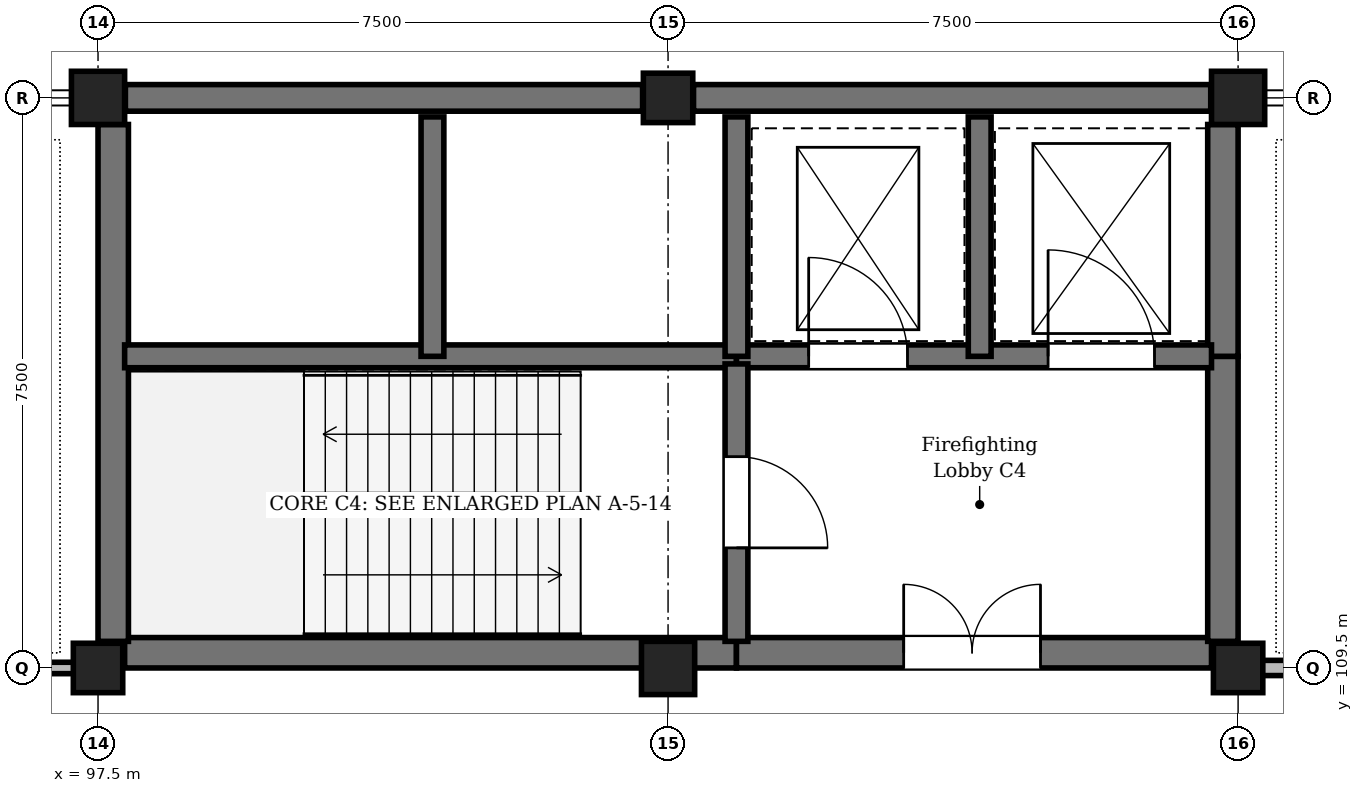
"""IFC4 building model, lengths in metres.
Left out: names, types, materials, properties, quantities, classifications, styles, units other than length and angle.
Written with IfcOpenShell. Run it as: python <this file> out.ifc"""

import sys

from ifc_helpers import new_model, si_unit, direction, frame, frame_2d, origin, origin_2d, place, context, subcontext, project, spatial, rectangle, extrude, element, fill, save


model = new_model("IFC4")
c1 = context("Model", 3, precision=1e-05, world=origin(), true_north=direction((0.0, 1.0)))
c2 = subcontext(c1, "Body", "Model", "MODEL_VIEW")
j1 = project(units=[si_unit("LENGTHUNIT", "METRE"), si_unit("PLANEANGLEUNIT", "RADIAN")], contexts=[c1])
p1 = place(None, origin())
s1 = spatial("IfcSite", under=j1, at=p1, CompositionType="ELEMENT")
p2 = place(p1, origin())
s2 = spatial("IfcBuilding", under=s1, at=p2, CompositionType="ELEMENT")
p3 = place(p2, frame((0.0, 0.0, 9.3)))
s3 = spatial("IfcBuildingStorey", under=s2, at=p3, CompositionType="ELEMENT", Elevation=9.3)
p4 = place(p3, frame((97.5, 109.5, 0.0), z_axis=(0.0, 0.0, 1.0), x_axis=(1.0, 0.0, 0.0)))
e1 = element("IfcColumn", 1, at=p4, inside=s3, PredefinedType="COLUMN", context=c2, shape_type="SweptSolid", body=[
    extrude(rectangle(XDim=0.65, YDim=0.65, at=origin_2d()), origin(), (0.0, 0.0, 1.0), 4.8),
])
for number, where, z_axis, x_axis in (
    (2, (97.5, 117.0, 0.0), (0.0, 0.0, 1.0), (1.0, 0.0, 0.0)),
    (3, (105.0, 109.5, 0.0), (0.0, 0.0, 1.0), (1.0, 0.0, 0.0)),
):
    element("IfcColumn", number, at=place(p3, frame(where, z_axis=z_axis, x_axis=x_axis)), inside=s3, PredefinedType="COLUMN", context=c2, shape_type="SweptSolid", body=[
        extrude(rectangle(XDim=0.7, YDim=0.7, at=origin_2d()), origin(), (0.0, 0.0, 1.0), 4.8),
    ])
for number, where, z_axis, x_axis in (
    (4, (105.0, 117.0, 0.0), (0.0, 0.0, 1.0), (1.0, 0.0, 0.0)),
    (5, (112.5, 109.5, 0.0), (0.0, 0.0, 1.0), (1.0, 0.0, 0.0)),
):
    element("IfcColumn", number, at=place(p3, frame(where, z_axis=z_axis, x_axis=x_axis)), inside=s3, PredefinedType="COLUMN", context=c2, shape_type="SweptSolid", body=[
        extrude(rectangle(XDim=0.65, YDim=0.65, at=origin_2d()), origin(), (0.0, 0.0, 1.0), 4.8),
    ])
p5 = place(p3, frame((112.5, 117.0, 0.0), z_axis=(0.0, 0.0, 1.0), x_axis=(1.0, 0.0, 0.0)))
e6 = element("IfcColumn", 6, at=p5, inside=s3, PredefinedType="COLUMN", context=c2, shape_type="SweptSolid", body=[
    extrude(rectangle(XDim=0.7, YDim=0.7, at=origin_2d()), origin(), (0.0, 0.0, 1.0), 4.8),
])
for number, where, z_axis, x_axis in (
    (7, (97.86, 117.0, 0.0), (0.0, 0.0, 1.0), (1.0, 0.0, 0.0)),
    (8, (105.335, 117.0, 0.0), (0.0, 0.0, 1.0), (1.0, 0.0, 0.0)),
):
    element("IfcWall", number, at=place(p3, frame(where, z_axis=z_axis, x_axis=x_axis)), inside=s3, PredefinedType="SHEAR", context=c2, shape_type="SweptSolid", body=[
        extrude(rectangle(XDim=6.805, YDim=0.35, at=frame_2d((3.402, 0.0))), origin(), (0.0, 0.0, 1.0), 4.55),
    ])
p6 = place(p3, frame((97.85, 109.7, 0.0), z_axis=(0.0, 0.0, 1.0), x_axis=(1.0, 0.0, 0.0)))
e9 = element("IfcWall", 9, at=p6, inside=s3, PredefinedType="SHEAR", context=c2, shape_type="SweptSolid", body=[
    extrude(rectangle(XDim=8.05, YDim=0.4, at=frame_2d((4.025, 0.0))), origin(), (0.0, 0.0, 1.0), 4.55),
])
p7 = place(p3, frame((105.9, 109.7, 0.0), z_axis=(0.0, 0.0, 1.0), x_axis=(1.0, 0.0, 0.0)))
e10 = element("IfcWall", 10, at=p7, inside=s3, PredefinedType="SHEAR", context=c2, shape_type="SweptSolid", body=[
    extrude(rectangle(XDim=6.25, YDim=0.4, at=frame_2d((3.125, 0.0))), origin(), (0.0, 0.0, 1.0), 4.55),
])
p8 = place(p7, frame((2.2, 0.0, 0.0)))
e11 = element("IfcOpeningElement", 11, at=p8, cuts=e10, PredefinedType="OPENING", context=c2, shape_type="SweptSolid", body=[
    extrude(rectangle(XDim=1.8, YDim=2.25, at=frame_2d((0.9, 1.125))), frame((0.0, 0.21, 0.0), z_axis=(0.0, -1.0, 0.0), x_axis=(1.0, 0.0, 0.0)), (0.0, 0.0, 1.0), 0.42),
])
p9 = place(p3, frame((97.7, 109.85, 0.0), z_axis=(0.0, 0.0, 1.0), x_axis=(0.0, 1.0, 0.0)))
e12 = element("IfcWall", 12, at=p9, inside=s3, PredefinedType="SHEAR", context=c2, shape_type="SweptSolid", body=[
    extrude(rectangle(XDim=6.8, YDim=0.4, at=frame_2d((3.4, 0.0))), origin(), (0.0, 0.0, 1.0), 4.55),
])
p10 = place(p3, frame((112.3, 109.85, 0.0), z_axis=(0.0, 0.0, 1.0), x_axis=(0.0, 1.0, 0.0)))
e13 = element("IfcWall", 13, at=p10, inside=s3, PredefinedType="SHEAR", context=c2, shape_type="SweptSolid", body=[
    extrude(rectangle(XDim=3.75, YDim=0.4, at=frame_2d((1.875, 0.0))), origin(), (0.0, 0.0, 1.0), 4.55),
])
p11 = place(p3, frame((112.3, 113.6, 0.0), z_axis=(0.0, 0.0, 1.0), x_axis=(0.0, 1.0, 0.0)))
e14 = element("IfcWall", 14, at=p11, inside=s3, PredefinedType="SHEAR", context=c2, shape_type="SweptSolid", body=[
    extrude(rectangle(XDim=3.05, YDim=0.4, at=frame_2d((1.525, 0.0))), origin(), (0.0, 0.0, 1.0), 4.55),
])
p12 = place(p3, frame((97.85, 113.6, 0.0), z_axis=(0.0, 0.0, 1.0), x_axis=(1.0, 0.0, 0.0)))
e15 = element("IfcWall", 15, at=p12, inside=s3, PredefinedType="SHEAR", context=c2, shape_type="SweptSolid", body=[
    extrude(rectangle(XDim=8.05, YDim=0.3, at=frame_2d((4.025, 0.0))), origin(), (0.0, 0.0, 1.0), 4.55),
])
p13 = place(p3, frame((105.9, 113.6, 0.0), z_axis=(0.0, 0.0, 1.0), x_axis=(1.0, 0.0, 0.0)))
e16 = element("IfcWall", 16, at=p13, inside=s3, PredefinedType="SHEAR", context=c2, shape_type="SweptSolid", body=[
    extrude(rectangle(XDim=6.25, YDim=0.3, at=frame_2d((3.125, 0.0))), origin(), (0.0, 0.0, 1.0), 4.55),
])
p14 = place(p13, frame((0.95, 0.0, 0.0)))
e17 = element("IfcOpeningElement", 17, at=p14, cuts=e16, PredefinedType="OPENING", context=c2, shape_type="SweptSolid", body=[
    extrude(rectangle(XDim=1.3, YDim=2.2, at=frame_2d((0.65, 1.1))), frame((0.0, 0.16, 0.0), z_axis=(0.0, -1.0, 0.0), x_axis=(1.0, 0.0, 0.0)), (0.0, 0.0, 1.0), 0.32),
])
p15 = place(p13, frame((4.1, 0.0, 0.0)))
e18 = element("IfcOpeningElement", 18, at=p15, cuts=e16, PredefinedType="OPENING", context=c2, shape_type="SweptSolid", body=[
    extrude(rectangle(XDim=1.4, YDim=2.25, at=frame_2d((0.7, 1.125))), frame((0.0, 0.16, 0.0), z_axis=(0.0, -1.0, 0.0), x_axis=(1.0, 0.0, 0.0)), (0.0, 0.0, 1.0), 0.32),
])
p16 = place(p3, frame((105.9, 113.5, 0.0), z_axis=(0.0, 0.0, 1.0), x_axis=(0.0, -1.0, 0.0)))
e19 = element("IfcWall", 19, at=p16, inside=s3, PredefinedType="SHEAR", context=c2, shape_type="SweptSolid", body=[
    extrude(rectangle(XDim=3.65, YDim=0.3, at=frame_2d((1.825, 0.0))), origin(), (0.0, 0.0, 1.0), 4.55),
])
p17 = place(p16, frame((1.22, 0.0, 0.0)))
e20 = element("IfcOpeningElement", 20, at=p17, cuts=e19, PredefinedType="OPENING", context=c2, shape_type="SweptSolid", body=[
    extrude(rectangle(XDim=1.2, YDim=2.25, at=frame_2d((0.6, 1.125))), frame((0.0, 0.16, 0.0), z_axis=(0.0, -1.0, 0.0), x_axis=(1.0, 0.0, 0.0)), (0.0, 0.0, 1.0), 0.32),
])
for number, where, z_axis, x_axis in (
    (21, (101.9, 113.6, 0.0), (0.0, 0.0, 1.0), (0.0, 1.0, 0.0)),
    (22, (105.9, 113.6, 0.0), (0.0, 0.0, 1.0), (0.0, 1.0, 0.0)),
    (23, (109.1, 113.6, 0.0), (0.0, 0.0, 1.0), (0.0, 1.0, 0.0)),
):
    element("IfcWall", number, at=place(p3, frame(where, z_axis=z_axis, x_axis=x_axis)), inside=s3, PredefinedType="SHEAR", context=c2, shape_type="SweptSolid", body=[
        extrude(rectangle(XDim=3.15, YDim=0.3, at=frame_2d((1.575, 0.0))), origin(), (0.0, 0.0, 1.0), 4.55),
    ])
p18 = place(p3, frame((75.3, 109.5, 0.0), z_axis=(0.0, 0.0, 1.0), x_axis=(1.0, 0.0, 0.0)))
e24 = element("IfcWall", 24, at=p18, inside=s3, PredefinedType="PARTITIONING", context=c2, shape_type="SweptSolid", body=[
    extrude(rectangle(XDim=21.9, YDim=0.15, at=frame_2d((10.95, 0.0))), origin(), (0.0, 0.0, 1.0), 3.985),
])
p19 = place(p18, frame((10.175, 0.0, 0.0)))
e25 = element("IfcOpeningElement", 25, at=p19, cuts=e24, PredefinedType="OPENING", context=c2, shape_type="SweptSolid", body=[
    extrude(rectangle(XDim=1.55, YDim=2.35, at=frame_2d((0.775, 1.175))), frame((0.0, 0.085, 0.0), z_axis=(0.0, -1.0, 0.0), x_axis=(1.0, 0.0, 0.0)), (0.0, 0.0, 1.0), 0.17),
])
p20 = place(p3, frame((112.8, 109.5, 0.0), z_axis=(0.0, 0.0, 1.0), x_axis=(1.0, 0.0, 0.0)))
e26 = element("IfcWall", 26, at=p20, inside=s3, PredefinedType="STANDARD", context=c2, shape_type="SweptSolid", body=[
    extrude(rectangle(XDim=14.35, YDim=0.2, at=frame_2d((7.175, 0.0))), origin(), (0.0, 0.0, 1.0), 3.985),
])
p21 = place(p20, frame((2.81, 0.0, 0.0)))
e27 = element("IfcOpeningElement", 27, at=p21, cuts=e26, PredefinedType="OPENING", context=c2, shape_type="SweptSolid", body=[
    extrude(rectangle(XDim=1.05, YDim=2.2, at=frame_2d((0.525, 1.1))), frame((0.0, 0.11, 0.0), z_axis=(0.0, -1.0, 0.0), x_axis=(1.0, 0.0, 0.0)), (0.0, 0.0, 1.0), 0.22),
])
p22 = place(p8, origin())
e28 = element("IfcDoor", 28, at=p22, inside=s3, OperationType="DOUBLE_DOOR_SINGLE_SWING", PredefinedType="DOOR", context=c2, shape_type="SweptSolid", body=[
    extrude(rectangle(XDim=1.8, YDim=2.25, at=frame_2d((0.9, 1.125))), frame((0.0, 0.025, 0.0), z_axis=(0.0, -1.0, 0.0), x_axis=(1.0, 0.0, 0.0)), (0.0, 0.0, 1.0), 0.05),
])
fill(e11, e28)
p23 = place(p14, origin())
e29 = element("IfcDoor", 29, at=p23, inside=s3, OperationType="DOUBLE_DOOR_SLIDING", PredefinedType="DOOR", context=c2, shape_type="SweptSolid", body=[
    extrude(rectangle(XDim=1.3, YDim=2.2, at=frame_2d((0.65, 1.1))), frame((0.0, 0.025, 0.0), z_axis=(0.0, -1.0, 0.0), x_axis=(1.0, 0.0, 0.0)), (0.0, 0.0, 1.0), 0.05),
])
fill(e17, e29)
p24 = place(p15, origin())
e30 = element("IfcDoor", 30, at=p24, inside=s3, OperationType="DOUBLE_DOOR_SLIDING", PredefinedType="DOOR", context=c2, shape_type="SweptSolid", body=[
    extrude(rectangle(XDim=1.4, YDim=2.25, at=frame_2d((0.7, 1.125))), frame((0.0, 0.025, 0.0), z_axis=(0.0, -1.0, 0.0), x_axis=(1.0, 0.0, 0.0)), (0.0, 0.0, 1.0), 0.05),
])
fill(e18, e30)
p25 = place(p17, origin())
e31 = element("IfcDoor", 31, at=p25, inside=s3, OperationType="SINGLE_SWING_RIGHT", PredefinedType="DOOR", context=c2, shape_type="SweptSolid", body=[
    extrude(rectangle(XDim=1.2, YDim=2.25, at=frame_2d((0.6, 1.125))), frame((0.0, 0.025, 0.0), z_axis=(0.0, -1.0, 0.0), x_axis=(1.0, 0.0, 0.0)), (0.0, 0.0, 1.0), 0.05),
])
fill(e20, e31)
save(model, sys.argv[1])
